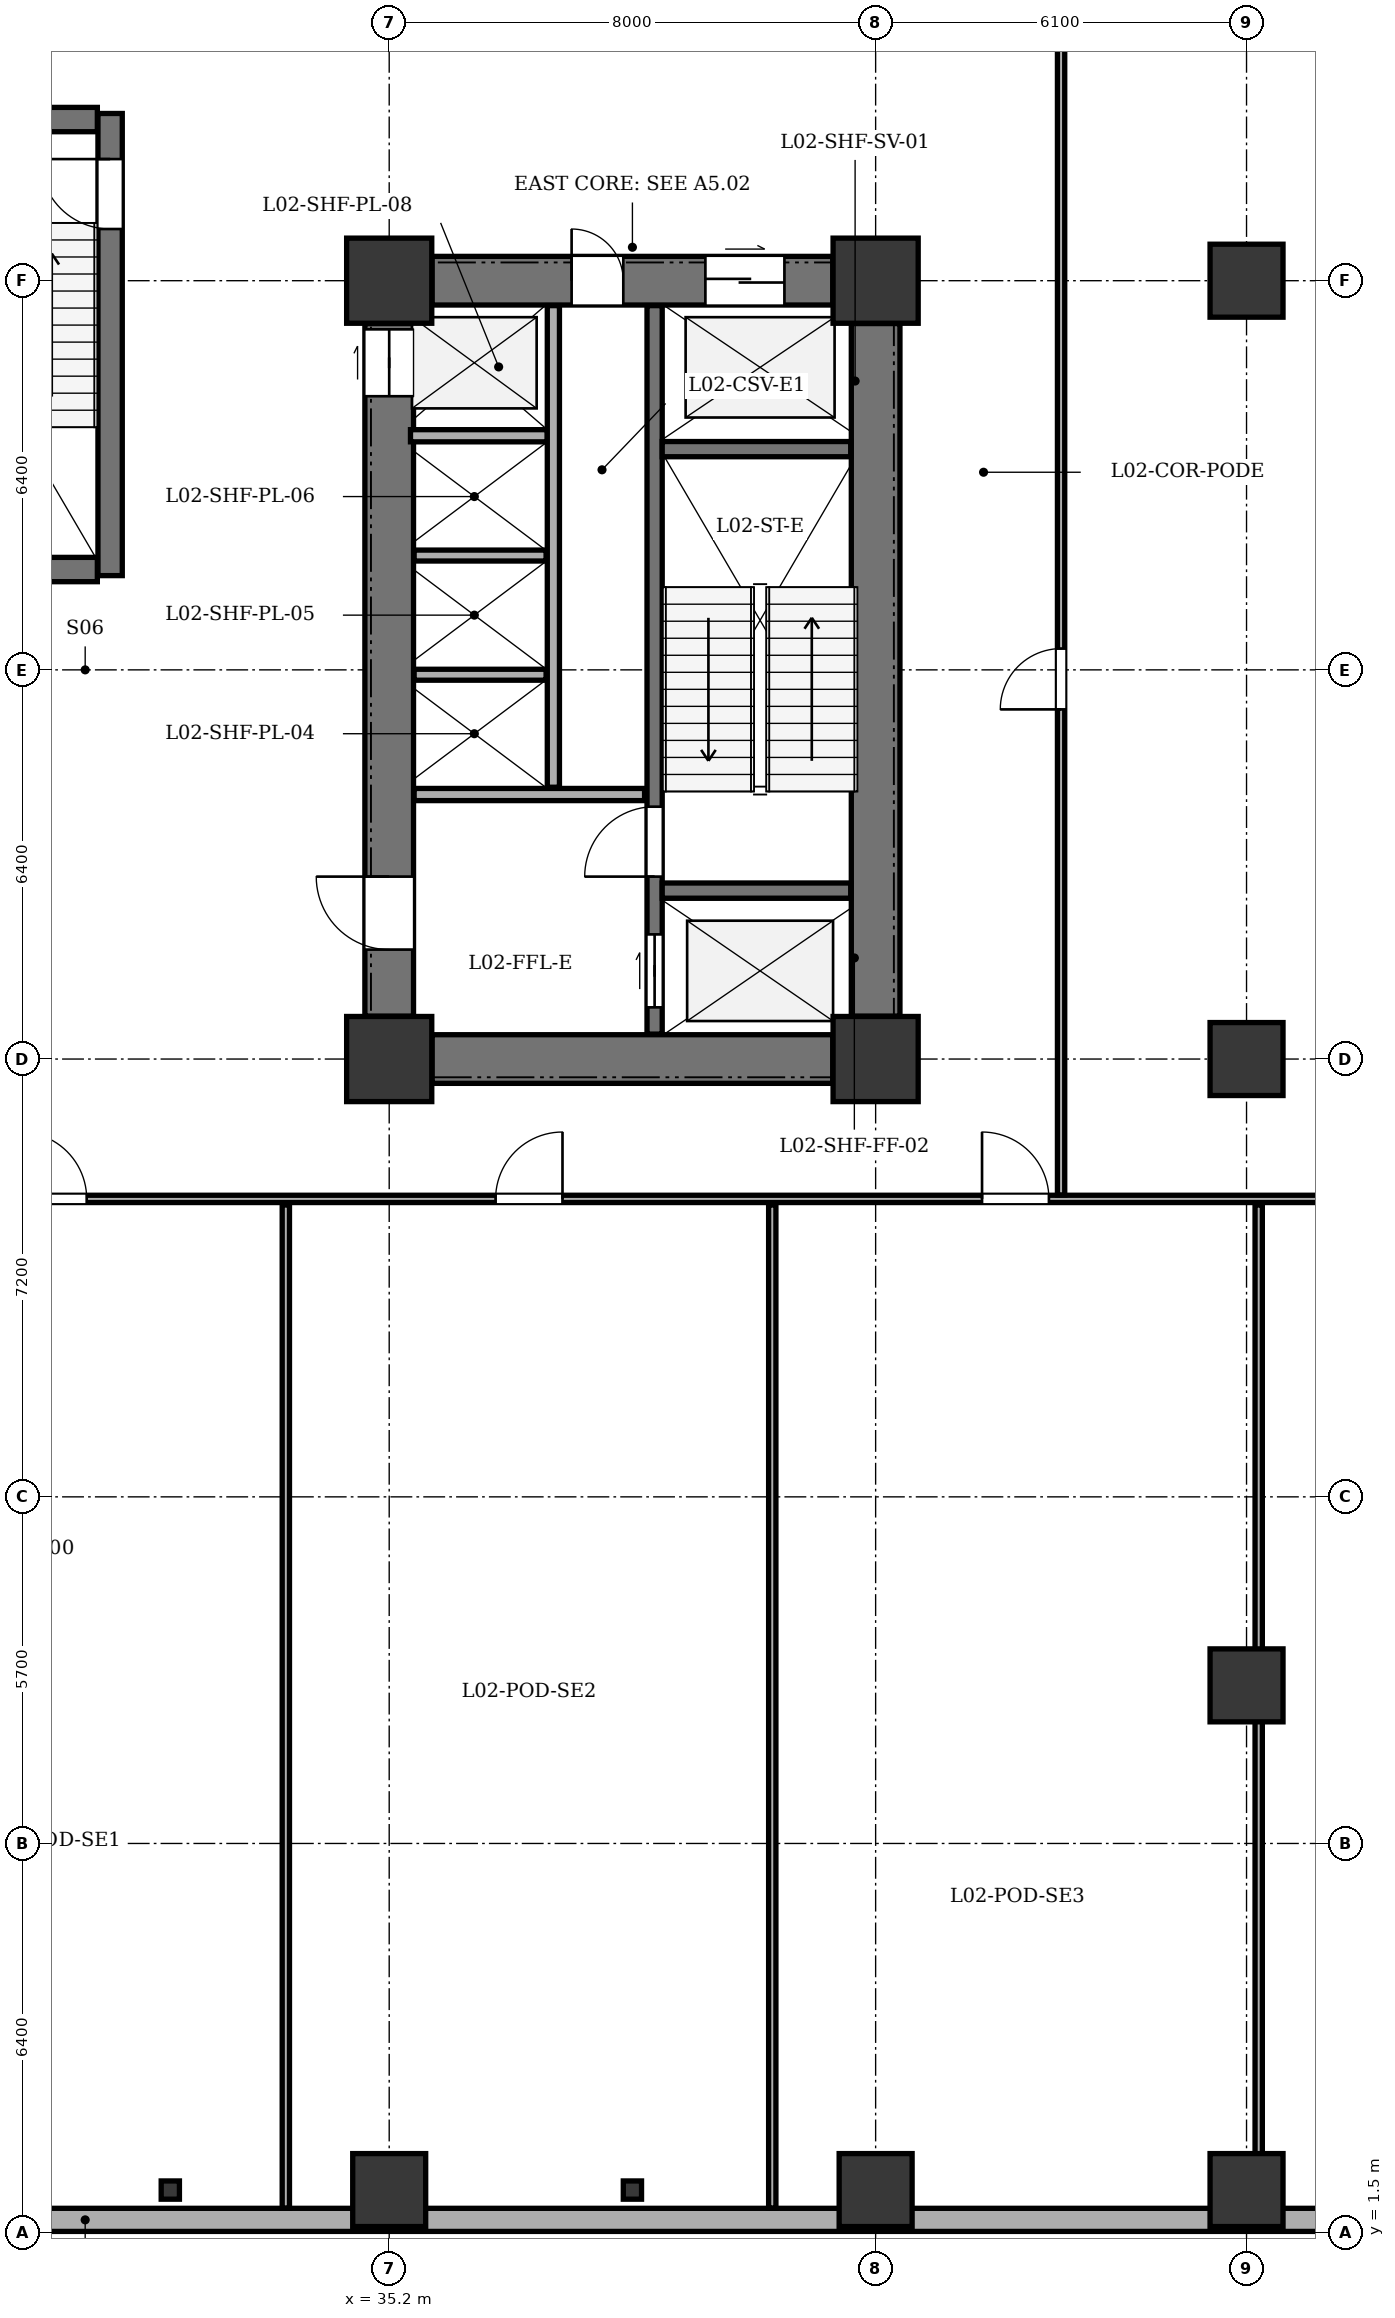
"""IFC4 building model, lengths in metres.
Left out: names, types, materials, properties, quantities, classifications, styles, units other than length and angle.
Written with IfcOpenShell. Run it as: python <this file> out.ifc"""

import sys

from ifc_helpers import new_model, si_unit, direction, frame, frame_2d, origin, origin_2d, place, context, subcontext, project, spatial, rectangle, i_section, extrude, element, fill, save


model = new_model("IFC4")
c1 = context("Model", 3, precision=1e-05, world=origin(), true_north=direction((0.0, 1.0)))
c2 = subcontext(c1, "Body", "Model", "MODEL_VIEW")
j1 = project(units=[si_unit("LENGTHUNIT", "METRE"), si_unit("PLANEANGLEUNIT", "RADIAN")], contexts=[c1])
p1 = place(None, origin())
s1 = spatial("IfcSite", under=j1, at=p1, CompositionType="ELEMENT")
p2 = place(p1, origin())
s2 = spatial("IfcBuilding", under=s1, at=p2, CompositionType="ELEMENT")
p3 = place(p2, frame((0.0, 0.0, 9.9)))
s3 = spatial("IfcBuildingStorey", under=s2, at=p3, CompositionType="ELEMENT", Elevation=9.9)
for number, where, z_axis, x_axis in (
    (1, (35.2, 20.8, 0.0), (0.0, 0.0, 1.0), (1.0, 0.0, 0.0)),
    (2, (43.2, 20.8, 0.0), (0.0, 0.0, 1.0), (1.0, 0.0, 0.0)),
    (3, (35.2, 33.6, 0.0), (0.0, 0.0, 1.0), (1.0, 0.0, 0.0)),
    (4, (43.2, 33.6, 0.0), (0.0, 0.0, 1.0), (1.0, 0.0, 0.0)),
):
    element("IfcColumn", number, at=place(p3, frame(where, z_axis=z_axis, x_axis=x_axis)), inside=s3, PredefinedType="COLUMN", context=c2, shape_type="SweptSolid", body=[
        extrude(rectangle(XDim=1.4, YDim=1.4, at=origin_2d()), origin(), (0.0, 0.0, 1.0), 4.5),
    ])
for number, where, z_axis, x_axis in (
    (5, (35.2, 2.2, 0.0), (0.0, 0.0, 1.0), (1.0, 0.0, 0.0)),
    (6, (43.2, 2.2, 0.0), (0.0, 0.0, 1.0), (1.0, 0.0, 0.0)),
    (7, (49.3, 2.2, 0.0), (0.0, 0.0, 1.0), (1.0, 0.0, 0.0)),
    (8, (49.3, 10.5, 0.0), (0.0, 0.0, 1.0), (1.0, 0.0, 0.0)),
    (9, (49.3, 20.8, 0.0), (0.0, 0.0, 1.0), (1.0, 0.0, 0.0)),
    (10, (49.3, 33.6, 0.0), (0.0, 0.0, 1.0), (1.0, 0.0, 0.0)),
):
    element("IfcColumn", number, at=place(p3, frame(where, z_axis=z_axis, x_axis=x_axis)), inside=s3, PredefinedType="COLUMN", context=c2, shape_type="SweptSolid", body=[
        extrude(rectangle(XDim=1.2, YDim=1.2, at=origin_2d()), origin(), (0.0, 0.0, 1.0), 4.5),
    ])
for number, where, z_axis, x_axis in (
    (11, (31.6, 2.2, 0.0), (0.0, 0.0, 1.0), (1.0, 0.0, 0.0)),
    (12, (39.2, 2.2, 0.0), (0.0, 0.0, 1.0), (1.0, 0.0, 0.0)),
):
    element("IfcColumn", number, at=place(p3, frame(where, z_axis=z_axis, x_axis=x_axis)), inside=s3, PredefinedType="PILASTER", context=c2, shape_type="SweptSolid", body=[
        extrude(i_section(OverallWidth=0.3, OverallDepth=0.3, WebThickness=0.011, FlangeThickness=0.019, at=origin_2d()), origin(), (0.0, 0.0, 1.0), 4.18),
    ])
p4 = place(p3, frame((55.0, 1.71, 0.0), z_axis=(0.0, 0.0, 1.0), x_axis=(-1.0, 0.0, 0.0)))
e13 = element("IfcWall", 13, at=p4, inside=s3, PredefinedType="STANDARD", context=c2, shape_type="SweptSolid", body=[
    extrude(rectangle(XDim=49.6, YDim=0.38, at=frame_2d((24.8, 0.0))), origin(), (0.0, 0.0, 1.0), 4.18),
])
p5 = place(p3, frame((43.2, 21.505, 0.0), z_axis=(0.0, 0.0, 1.0), x_axis=(0.0, 1.0, 0.0)))
e14 = element("IfcWall", 14, at=p5, inside=s3, PredefinedType="SHEAR", context=c2, shape_type="SweptSolid", body=[
    extrude(rectangle(XDim=11.39, YDim=0.8, at=frame_2d((5.695, 0.0))), origin(), (0.0, 0.0, 1.0), 4.18),
])
p6 = place(p3, frame((35.905, 20.8, 0.0), z_axis=(0.0, 0.0, 1.0), x_axis=(1.0, 0.0, 0.0)))
e15 = element("IfcWall", 15, at=p6, inside=s3, PredefinedType="SHEAR", context=c2, shape_type="SweptSolid", body=[
    extrude(rectangle(XDim=6.59, YDim=0.8, at=frame_2d((3.295, 0.0))), origin(), (0.0, 0.0, 1.0), 4.18),
])
p7 = place(p3, frame((35.905, 33.6, 0.0), z_axis=(0.0, 0.0, 1.0), x_axis=(1.0, 0.0, 0.0)))
e16 = element("IfcWall", 16, at=p7, inside=s3, PredefinedType="SHEAR", context=c2, shape_type="SweptSolid", body=[
    extrude(rectangle(XDim=6.59, YDim=0.8, at=frame_2d((3.295, 0.0))), origin(), (0.0, 0.0, 1.0), 4.18),
])
p8 = place(p7, frame((4.495, 0.0, 0.0)))
e17 = element("IfcOpeningElement", 17, at=p8, cuts=e16, PredefinedType="OPENING", context=c2, shape_type="SweptSolid", body=[
    extrude(rectangle(XDim=1.3, YDim=2.15, at=frame_2d((0.65, 1.075))), frame((0.0, 0.41, 0.0), z_axis=(0.0, -1.0, 0.0), x_axis=(1.0, 0.0, 0.0)), (0.0, 0.0, 1.0), 0.82),
])
p9 = place(p7, frame((2.295, 0.0, 0.0)))
e18 = element("IfcOpeningElement", 18, at=p9, cuts=e16, PredefinedType="OPENING", context=c2, shape_type="SweptSolid", body=[
    extrude(rectangle(XDim=0.85, YDim=2.02, at=frame_2d((0.425, 1.01))), frame((0.0, 0.41, 0.0), z_axis=(0.0, -1.0, 0.0), x_axis=(1.0, 0.0, 0.0)), (0.0, 0.0, 1.0), 0.82),
])
p10 = place(p3, frame((35.2, 21.505, 0.0), z_axis=(0.0, 0.0, 1.0), x_axis=(0.0, 1.0, 0.0)))
e19 = element("IfcWall", 19, at=p10, inside=s3, PredefinedType="SHEAR", context=c2, shape_type="SweptSolid", body=[
    extrude(rectangle(XDim=11.39, YDim=0.8, at=frame_2d((5.695, 0.0))), origin(), (0.0, 0.0, 1.0), 4.18),
])
p11 = place(p10, frame((1.095, 0.0, 0.0)))
e20 = element("IfcOpeningElement", 20, at=p11, cuts=e19, PredefinedType="OPENING", context=c2, shape_type="SweptSolid", body=[
    extrude(rectangle(XDim=1.2, YDim=2.15, at=frame_2d((0.6, 1.075))), frame((0.0, 0.41, 0.0), z_axis=(0.0, -1.0, 0.0), x_axis=(1.0, 0.0, 0.0)), (0.0, 0.0, 1.0), 0.82),
])
p12 = place(p10, frame((10.195, 0.0, 0.0)))
e21 = element("IfcOpeningElement", 21, at=p12, cuts=e19, PredefinedType="OPENING", context=c2, shape_type="SweptSolid", body=[
    extrude(rectangle(XDim=1.1, YDim=2.1, at=frame_2d((0.55, 1.05))), frame((0.0, 0.41, 0.0), z_axis=(0.0, -1.0, 0.0), x_axis=(1.0, 0.0, 0.0)), (0.0, 0.0, 1.0), 0.82),
])
p13 = place(p3, frame((39.565, 21.21, 0.0), z_axis=(0.0, 0.0, 1.0), x_axis=(0.0, 1.0, 0.0)))
e22 = element("IfcWall", 22, at=p13, inside=s3, PredefinedType="SHEAR", context=c2, shape_type="SweptSolid", body=[
    extrude(rectangle(XDim=11.98, YDim=0.25, at=frame_2d((5.99, 0.0))), origin(), (0.0, 0.0, 1.0), 4.18),
])
p14 = place(p13, frame((0.44, 0.0, 0.0)))
e23 = element("IfcOpeningElement", 23, at=p14, cuts=e22, PredefinedType="OPENING", context=c2, shape_type="SweptSolid", body=[
    extrude(rectangle(XDim=1.2, YDim=2.15, at=frame_2d((0.6, 1.075))), frame((0.0, 0.135, 0.0), z_axis=(0.0, -1.0, 0.0), x_axis=(1.0, 0.0, 0.0)), (0.0, 0.0, 1.0), 0.27),
])
p15 = place(p13, frame((2.59, 0.0, 0.0)))
e24 = element("IfcOpeningElement", 24, at=p15, cuts=e22, PredefinedType="OPENING", context=c2, shape_type="SweptSolid", body=[
    extrude(rectangle(XDim=1.15, YDim=2.15, at=frame_2d((0.575, 1.075))), frame((0.0, 0.135, 0.0), z_axis=(0.0, -1.0, 0.0), x_axis=(1.0, 0.0, 0.0)), (0.0, 0.0, 1.0), 0.27),
])
for number, where, z_axis, x_axis in (
    (25, (39.69, 23.57, 0.0), (0.0, 0.0, 1.0), (1.0, 0.0, 0.0)),
    (26, (39.69, 30.83, 0.0), (0.0, 0.0, 1.0), (1.0, 0.0, 0.0)),
):
    element("IfcWall", number, at=place(p3, frame(where, z_axis=z_axis, x_axis=x_axis)), inside=s3, PredefinedType="SHEAR", context=c2, shape_type="SweptSolid", body=[
        extrude(rectangle(XDim=3.1, YDim=0.25, at=frame_2d((1.55, 0.0))), origin(), (0.0, 0.0, 1.0), 4.18),
    ])
p16 = place(p3, frame((35.61, 25.15, 0.0), z_axis=(0.0, 0.0, 1.0), x_axis=(1.0, 0.0, 0.0)))
e27 = element("IfcWall", 27, at=p16, inside=s3, PredefinedType="SOLIDWALL", context=c2, shape_type="SweptSolid", body=[
    extrude(rectangle(XDim=3.79, YDim=0.2, at=frame_2d((1.895, 0.0))), origin(), (0.0, 0.0, 1.0), 4.18),
])
p17 = place(p3, frame((35.55, 31.05, 0.0), z_axis=(0.0, 0.0, 1.0), x_axis=(1.0, 0.0, 0.0)))
e28 = element("IfcWall", 28, at=p17, inside=s3, PredefinedType="SOLIDWALL", context=c2, shape_type="SweptSolid", body=[
    extrude(rectangle(XDim=2.25, YDim=0.2, at=frame_2d((1.125, 0.0))), origin(), (0.0, 0.0, 1.0), 4.18),
])
p18 = place(p3, frame((37.9, 25.27, 0.0), z_axis=(0.0, 0.0, 1.0), x_axis=(0.0, 1.0, 0.0)))
e29 = element("IfcWall", 29, at=p18, inside=s3, PredefinedType="SOLIDWALL", context=c2, shape_type="SweptSolid", body=[
    extrude(rectangle(XDim=7.92, YDim=0.2, at=frame_2d((3.96, 0.0))), origin(), (0.0, 0.0, 1.0), 4.18),
])
for number, where, z_axis, x_axis in (
    (30, (35.61, 27.12, 0.0), (0.0, 0.0, 1.0), (1.0, 0.0, 0.0)),
    (31, (35.61, 29.08, 0.0), (0.0, 0.0, 1.0), (1.0, 0.0, 0.0)),
):
    element("IfcWall", number, at=place(p3, frame(where, z_axis=z_axis, x_axis=x_axis)), inside=s3, PredefinedType="PARTITIONING", context=c2, shape_type="SweptSolid", body=[
        extrude(rectangle(XDim=2.17, YDim=0.18, at=frame_2d((1.085, 0.0))), origin(), (0.0, 0.0, 1.0), 4.18),
    ])
p19 = place(p3, frame((30.61, 28.75, 0.0), z_axis=(0.0, 0.0, 1.0), x_axis=(0.0, 1.0, 0.0)))
e32 = element("IfcWall", 32, at=p19, inside=s3, PredefinedType="SHEAR", context=c2, shape_type="SweptSolid", body=[
    extrude(rectangle(XDim=7.6, YDim=0.4, at=frame_2d((3.8, 0.0))), origin(), (0.0, 0.0, 1.0), 4.18),
])
p20 = place(p19, frame((5.7, 0.0, 0.0)))
e33 = element("IfcOpeningElement", 33, at=p20, cuts=e32, PredefinedType="OPENING", context=c2, shape_type="SweptSolid", body=[
    extrude(rectangle(XDim=1.15, YDim=2.15, at=frame_2d((0.575, 1.075))), frame((0.0, 0.21, 0.0), z_axis=(0.0, -1.0, 0.0), x_axis=(1.0, 0.0, 0.0)), (0.0, 0.0, 1.0), 0.42),
])
for number, where, z_axis, x_axis in (
    (34, (27.2, 28.85, 0.0), (0.0, 0.0, 1.0), (1.0, 0.0, 0.0)),
    (35, (27.2, 36.25, 0.0), (0.0, 0.0, 1.0), (1.0, 0.0, 0.0)),
):
    element("IfcWall", number, at=place(p3, frame(where, z_axis=z_axis, x_axis=x_axis)), inside=s3, PredefinedType="SHEAR", context=c2, shape_type="SweptSolid", body=[
        extrude(rectangle(XDim=3.2, YDim=0.4, at=frame_2d((1.6, 0.0))), origin(), (0.0, 0.0, 1.0), 4.18),
    ])
p21 = place(p3, frame((26.015, 18.5, 0.0), z_axis=(0.0, 0.0, 1.0), x_axis=(1.0, 0.0, 0.0)))
e36 = element("IfcWall", 36, at=p21, inside=s3, PredefinedType="PARTITIONING", context=c2, shape_type="SweptSolid", body=[
    extrude(rectangle(XDim=31.58, YDim=0.12, at=frame_2d((15.79, 0.0))), origin(), (0.0, 0.0, 1.0), 3.665),
])
p22 = place(p21, frame((3.11, 0.0, 0.0)))
e37 = element("IfcOpeningElement", 37, at=p22, cuts=e36, PredefinedType="OPENING", context=c2, shape_type="SweptSolid", body=[
    extrude(rectangle(XDim=1.1, YDim=2.15, at=frame_2d((0.55, 1.075))), frame((0.0, 0.07, 0.0), z_axis=(0.0, -1.0, 0.0), x_axis=(1.0, 0.0, 0.0)), (0.0, 0.0, 1.0), 0.14),
])
p23 = place(p21, frame((10.935, 0.0, 0.0)))
e38 = element("IfcOpeningElement", 38, at=p23, cuts=e36, PredefinedType="OPENING", context=c2, shape_type="SweptSolid", body=[
    extrude(rectangle(XDim=1.1, YDim=2.15, at=frame_2d((0.55, 1.075))), frame((0.0, 0.07, 0.0), z_axis=(0.0, -1.0, 0.0), x_axis=(1.0, 0.0, 0.0)), (0.0, 0.0, 1.0), 0.14),
])
p24 = place(p21, frame((18.935, 0.0, 0.0)))
e39 = element("IfcOpeningElement", 39, at=p24, cuts=e36, PredefinedType="OPENING", context=c2, shape_type="SweptSolid", body=[
    extrude(rectangle(XDim=1.1, YDim=2.15, at=frame_2d((0.55, 1.075))), frame((0.0, 0.07, 0.0), z_axis=(0.0, -1.0, 0.0), x_axis=(1.0, 0.0, 0.0)), (0.0, 0.0, 1.0), 0.14),
])
p25 = place(p21, frame((26.685, 0.0, 0.0)))
e40 = element("IfcOpeningElement", 40, at=p25, cuts=e36, PredefinedType="OPENING", context=c2, shape_type="SweptSolid", body=[
    extrude(rectangle(XDim=1.1, YDim=2.15, at=frame_2d((0.55, 1.075))), frame((0.0, 0.07, 0.0), z_axis=(0.0, -1.0, 0.0), x_axis=(1.0, 0.0, 0.0)), (0.0, 0.0, 1.0), 0.14),
])
p26 = place(p3, frame((33.5, 1.905, 0.0), z_axis=(0.0, 0.0, 1.0), x_axis=(0.0, 1.0, 0.0)))
e41 = element("IfcWall", 41, at=p26, inside=s3, PredefinedType="PARTITIONING", context=c2, shape_type="SweptSolid", body=[
    extrude(rectangle(XDim=16.495, YDim=0.12, at=frame_2d((8.248, 0.0))), origin(), (0.0, 0.0, 1.0), 3.665),
])
p27 = place(p3, frame((41.5, 1.905, 0.0), z_axis=(0.0, 0.0, 1.0), x_axis=(0.0, 1.0, 0.0)))
e42 = element("IfcWall", 42, at=p27, inside=s3, PredefinedType="PARTITIONING", context=c2, shape_type="SweptSolid", body=[
    extrude(rectangle(XDim=16.495, YDim=0.12, at=frame_2d((8.248, 0.0))), origin(), (0.0, 0.0, 1.0), 4.18),
])
p28 = place(p3, frame((49.5, 1.905, 0.0), z_axis=(0.0, 0.0, 1.0), x_axis=(0.0, 1.0, 0.0)))
e43 = element("IfcWall", 43, at=p28, inside=s3, PredefinedType="PARTITIONING", context=c2, shape_type="SweptSolid", body=[
    extrude(rectangle(XDim=16.495, YDim=0.12, at=frame_2d((8.248, 0.0))), origin(), (0.0, 0.0, 1.0), 3.065),
])
p29 = place(p3, frame((46.25, 18.565, 0.0), z_axis=(0.0, 0.0, 1.0), x_axis=(0.0, 1.0, 0.0)))
e44 = element("IfcWall", 44, at=p29, inside=s3, PredefinedType="PARTITIONING", context=c2, shape_type="SweptSolid", body=[
    extrude(rectangle(XDim=19.72, YDim=0.12, at=frame_2d((9.86, 0.0))), origin(), (0.0, 0.0, 1.0), 4.18),
])
p30 = place(p29, frame((7.985, 0.0, 0.0)))
e45 = element("IfcOpeningElement", 45, at=p30, cuts=e44, PredefinedType="OPENING", context=c2, shape_type="SweptSolid", body=[
    extrude(rectangle(XDim=1.0, YDim=2.1, at=frame_2d((0.5, 1.05))), frame((0.0, 0.07, 0.0), z_axis=(0.0, -1.0, 0.0), x_axis=(1.0, 0.0, 0.0)), (0.0, 0.0, 1.0), 0.14),
])
p31 = place(p8, origin())
e46 = element("IfcDoor", 46, at=p31, inside=s3, OperationType="DOUBLE_DOOR_SLIDING", PredefinedType="DOOR", context=c2, shape_type="SweptSolid", body=[
    extrude(rectangle(XDim=1.3, YDim=2.15, at=frame_2d((0.65, 1.075))), frame((0.0, 0.025, 0.0), z_axis=(0.0, -1.0, 0.0), x_axis=(1.0, 0.0, 0.0)), (0.0, 0.0, 1.0), 0.05),
])
fill(e17, e46)
p32 = place(p9, origin())
e47 = element("IfcDoor", 47, at=p32, inside=s3, OperationType="SINGLE_SWING_LEFT", PredefinedType="DOOR", context=c2, shape_type="SweptSolid", body=[
    extrude(rectangle(XDim=0.85, YDim=2.02, at=frame_2d((0.425, 1.01))), frame((0.0, 0.025, 0.0), z_axis=(0.0, -1.0, 0.0), x_axis=(1.0, 0.0, 0.0)), (0.0, 0.0, 1.0), 0.05),
])
fill(e18, e47)
p33 = place(p11, origin())
e48 = element("IfcDoor", 48, at=p33, inside=s3, OperationType="SINGLE_SWING_RIGHT", PredefinedType="DOOR", context=c2, shape_type="SweptSolid", body=[
    extrude(rectangle(XDim=1.2, YDim=2.15, at=frame_2d((0.6, 1.075))), frame((0.0, 0.025, 0.0), z_axis=(0.0, -1.0, 0.0), x_axis=(1.0, 0.0, 0.0)), (0.0, 0.0, 1.0), 0.05),
])
fill(e20, e48)
p34 = place(p12, origin())
e49 = element("IfcDoor", 49, at=p34, inside=s3, OperationType="DOUBLE_DOOR_SLIDING", PredefinedType="DOOR", context=c2, shape_type="SweptSolid", body=[
    extrude(rectangle(XDim=1.1, YDim=2.1, at=frame_2d((0.55, 1.05))), frame((0.0, 0.025, 0.0), z_axis=(0.0, -1.0, 0.0), x_axis=(1.0, 0.0, 0.0)), (0.0, 0.0, 1.0), 0.05),
])
fill(e21, e49)
p35 = place(p14, origin())
e50 = element("IfcDoor", 50, at=p35, inside=s3, OperationType="DOUBLE_DOOR_SLIDING", PredefinedType="DOOR", context=c2, shape_type="SweptSolid", body=[
    extrude(rectangle(XDim=1.2, YDim=2.15, at=frame_2d((0.6, 1.075))), frame((0.0, 0.025, 0.0), z_axis=(0.0, -1.0, 0.0), x_axis=(1.0, 0.0, 0.0)), (0.0, 0.0, 1.0), 0.05),
])
fill(e23, e50)
p36 = place(p15, origin())
e51 = element("IfcDoor", 51, at=p36, inside=s3, OperationType="SINGLE_SWING_LEFT", PredefinedType="DOOR", context=c2, shape_type="SweptSolid", body=[
    extrude(rectangle(XDim=1.15, YDim=2.15, at=frame_2d((0.575, 1.075))), frame((0.0, 0.025, 0.0), z_axis=(0.0, -1.0, 0.0), x_axis=(1.0, 0.0, 0.0)), (0.0, 0.0, 1.0), 0.05),
])
fill(e24, e51)
p37 = place(p20, origin())
e52 = element("IfcDoor", 52, at=p37, inside=s3, OperationType="SINGLE_SWING_RIGHT", PredefinedType="DOOR", context=c2, shape_type="SweptSolid", body=[
    extrude(rectangle(XDim=1.15, YDim=2.15, at=frame_2d((0.575, 1.075))), frame((0.0, 0.025, 0.0), z_axis=(0.0, -1.0, 0.0), x_axis=(1.0, 0.0, 0.0)), (0.0, 0.0, 1.0), 0.05),
])
fill(e33, e52)
p38 = place(p22, origin())
e53 = element("IfcDoor", 53, at=p38, inside=s3, OperationType="SINGLE_SWING_LEFT", PredefinedType="DOOR", context=c2, shape_type="SweptSolid", body=[
    extrude(rectangle(XDim=1.1, YDim=2.15, at=frame_2d((0.55, 1.075))), frame((0.0, 0.025, 0.0), z_axis=(0.0, -1.0, 0.0), x_axis=(1.0, 0.0, 0.0)), (0.0, 0.0, 1.0), 0.05),
])
fill(e37, e53)
p39 = place(p23, origin())
e54 = element("IfcDoor", 54, at=p39, inside=s3, OperationType="SINGLE_SWING_RIGHT", PredefinedType="DOOR", context=c2, shape_type="SweptSolid", body=[
    extrude(rectangle(XDim=1.1, YDim=2.15, at=frame_2d((0.55, 1.075))), frame((0.0, 0.025, 0.0), z_axis=(0.0, -1.0, 0.0), x_axis=(1.0, 0.0, 0.0)), (0.0, 0.0, 1.0), 0.05),
])
fill(e38, e54)
p40 = place(p24, origin())
e55 = element("IfcDoor", 55, at=p40, inside=s3, OperationType="SINGLE_SWING_LEFT", PredefinedType="DOOR", context=c2, shape_type="SweptSolid", body=[
    extrude(rectangle(XDim=1.1, YDim=2.15, at=frame_2d((0.55, 1.075))), frame((0.0, 0.025, 0.0), z_axis=(0.0, -1.0, 0.0), x_axis=(1.0, 0.0, 0.0)), (0.0, 0.0, 1.0), 0.05),
])
fill(e39, e55)
p41 = place(p30, origin())
e56 = element("IfcDoor", 56, at=p41, inside=s3, OperationType="SINGLE_SWING_LEFT", PredefinedType="DOOR", context=c2, shape_type="SweptSolid", body=[
    extrude(rectangle(XDim=1.0, YDim=2.1, at=frame_2d((0.5, 1.05))), frame((0.0, 0.025, 0.0), z_axis=(0.0, -1.0, 0.0), x_axis=(1.0, 0.0, 0.0)), (0.0, 0.0, 1.0), 0.05),
])
fill(e45, e56)
save(model, sys.argv[1])
